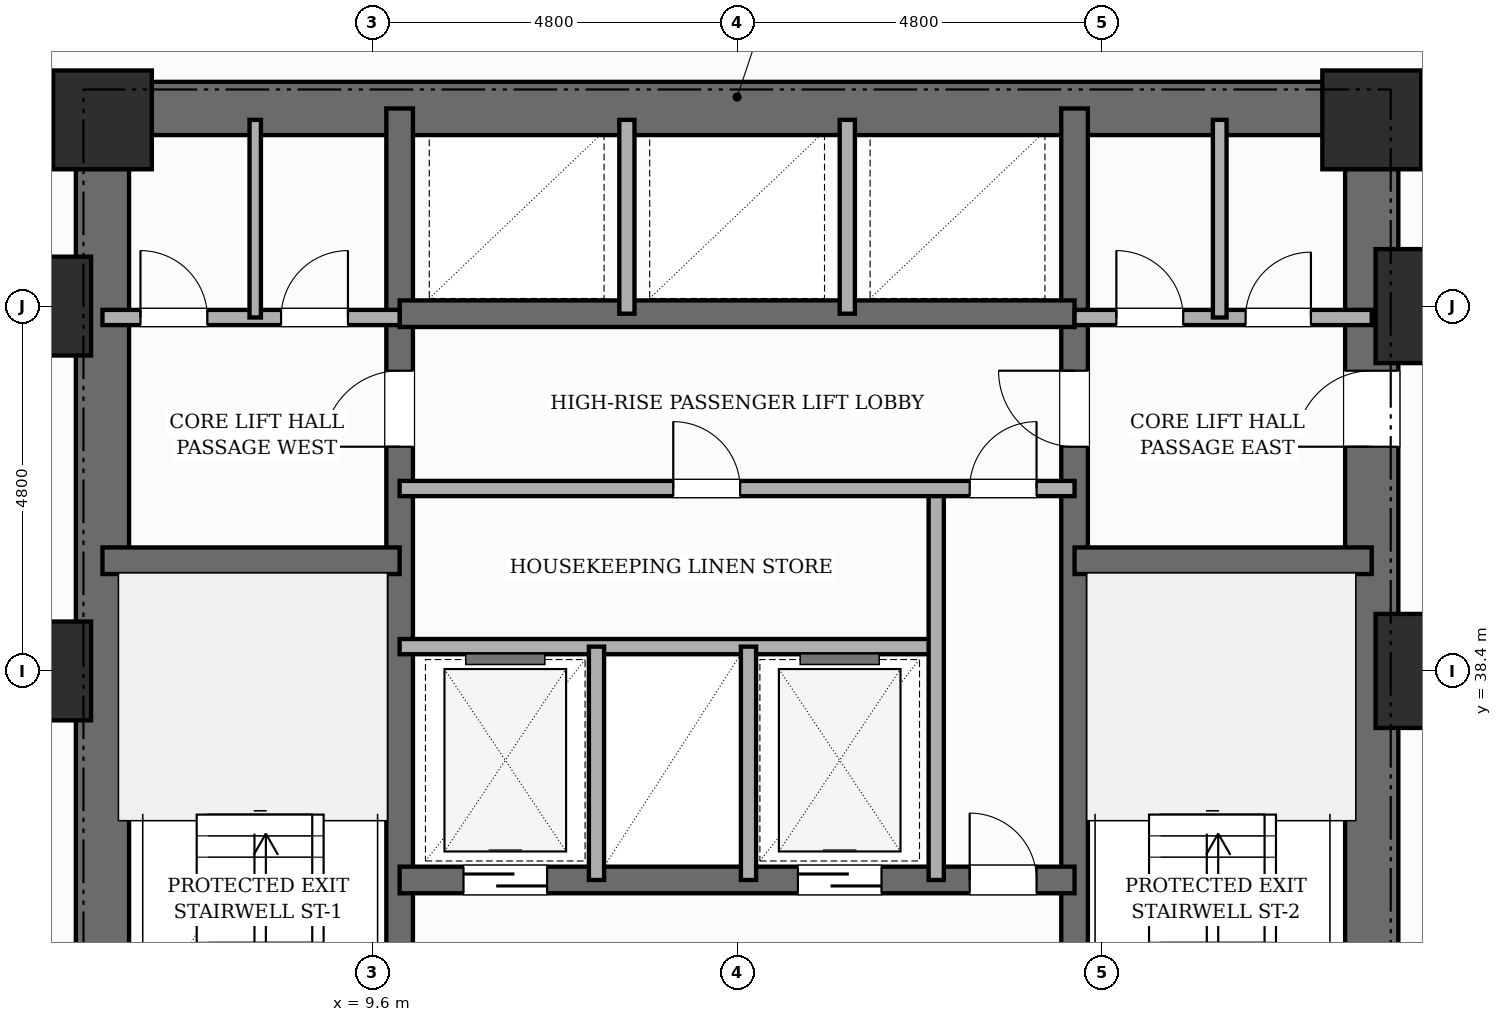
"""IFC4 building model, lengths in metres.
Left out: names, types, materials, properties, quantities, classifications, styles, units other than length and angle.
Written with IfcOpenShell. Run it as: python <this file> out.ifc"""

import sys

from ifc_helpers import new_model, si_unit, direction, frame, frame_2d, origin, origin_2d, place, context, subcontext, project, spatial, rectangle, extrude, element, fill, save


model = new_model("IFC4")
c1 = context("Model", 3, precision=1e-05, world=origin(), true_north=direction((0.0, 1.0)))
c2 = subcontext(c1, "Body", "Model", "MODEL_VIEW")
j1 = project(units=[si_unit("LENGTHUNIT", "METRE"), si_unit("PLANEANGLEUNIT", "RADIAN")], contexts=[c1])
p1 = place(None, origin())
s1 = spatial("IfcSite", under=j1, at=p1, CompositionType="ELEMENT")
p2 = place(p1, origin())
s2 = spatial("IfcBuilding", under=s1, at=p2, CompositionType="ELEMENT")
p3 = place(p2, frame((0.0, 0.0, 14.8)))
s3 = spatial("IfcBuildingStorey", under=s2, at=p3, CompositionType="ELEMENT", Elevation=14.8)
p4 = place(p3, frame((6.05, 30.55, 0.0), z_axis=(0.0, 0.0, 1.0), x_axis=(0.0, 1.0, 0.0)))
e1 = element("IfcWall", 1, at=p4, inside=s3, PredefinedType="SHEAR", context=c2, shape_type="SweptSolid", body=[
    extrude(rectangle(XDim=15.6, YDim=0.7, at=frame_2d((7.8, 0.0))), origin(), (0.0, 0.0, 1.0), 4.8),
])
p5 = place(p3, frame((22.75, 30.55, 0.0), z_axis=(0.0, 0.0, 1.0), x_axis=(0.0, 1.0, 0.0)))
e2 = element("IfcWall", 2, at=p5, inside=s3, PredefinedType="SHEAR", context=c2, shape_type="SweptSolid", body=[
    extrude(rectangle(XDim=15.6, YDim=0.7, at=frame_2d((7.8, 0.0))), origin(), (0.0, 0.0, 1.0), 4.8),
])
p6 = place(p5, frame((10.8, 0.0, 0.0)))
e3 = element("IfcOpeningElement", 3, at=p6, cuts=e2, PredefinedType="OPENING", context=c2, shape_type="SweptSolid", body=[
    extrude(rectangle(XDim=1.0, YDim=2.15, at=frame_2d((0.5, 1.075))), frame((0.0, 0.36, 0.0), z_axis=(0.0, -1.0, 0.0), x_axis=(1.0, 0.0, 0.0)), (0.0, 0.0, 1.0), 0.72),
])
p7 = place(p3, frame((6.05, 45.8, 0.0), z_axis=(0.0, 0.0, 1.0), x_axis=(1.0, 0.0, 0.0)))
e4 = element("IfcWall", 4, at=p7, inside=s3, PredefinedType="SHEAR", context=c2, shape_type="SweptSolid", body=[
    extrude(rectangle(XDim=16.7, YDim=0.7, at=frame_2d((8.35, 0.0))), origin(), (0.0, 0.0, 1.0), 4.8),
])
p8 = place(p3, frame((9.96, 30.9, 0.0), z_axis=(0.0, 0.0, 1.0), x_axis=(0.0, 1.0, 0.0)))
e5 = element("IfcWall", 5, at=p8, inside=s3, PredefinedType="SHEAR", context=c2, shape_type="SweptSolid", body=[
    extrude(rectangle(XDim=14.9, YDim=0.35, at=frame_2d((7.45, 0.0))), origin(), (0.0, 0.0, 1.0), 4.8),
])
p9 = place(p8, frame((0.65, 0.0, 0.0)))
e6 = element("IfcOpeningElement", 6, at=p9, cuts=e5, PredefinedType="OPENING", context=c2, shape_type="SweptSolid", body=[
    extrude(rectangle(XDim=0.95, YDim=2.1, at=frame_2d((0.475, 1.05))), frame((0.0, 0.185, 0.0), z_axis=(0.0, -1.0, 0.0), x_axis=(1.0, 0.0, 0.0)), (0.0, 0.0, 1.0), 0.37),
])
p10 = place(p8, frame((10.45, 0.0, 0.0)))
e7 = element("IfcOpeningElement", 7, at=p10, cuts=e5, PredefinedType="OPENING", context=c2, shape_type="SweptSolid", body=[
    extrude(rectangle(XDim=1.0, YDim=2.15, at=frame_2d((0.5, 1.075))), frame((0.0, 0.185, 0.0), z_axis=(0.0, -1.0, 0.0), x_axis=(1.0, 0.0, 0.0)), (0.0, 0.0, 1.0), 0.37),
])
p11 = place(p3, frame((18.84, 30.9, 0.0), z_axis=(0.0, 0.0, 1.0), x_axis=(0.0, 1.0, 0.0)))
e8 = element("IfcWall", 8, at=p11, inside=s3, PredefinedType="SHEAR", context=c2, shape_type="SweptSolid", body=[
    extrude(rectangle(XDim=14.9, YDim=0.35, at=frame_2d((7.45, 0.0))), origin(), (0.0, 0.0, 1.0), 4.8),
])
p12 = place(p11, frame((0.65, 0.0, 0.0)))
e9 = element("IfcOpeningElement", 9, at=p12, cuts=e8, PredefinedType="OPENING", context=c2, shape_type="SweptSolid", body=[
    extrude(rectangle(XDim=0.95, YDim=2.1, at=frame_2d((0.475, 1.05))), frame((0.0, 0.185, 0.0), z_axis=(0.0, -1.0, 0.0), x_axis=(1.0, 0.0, 0.0)), (0.0, 0.0, 1.0), 0.37),
])
p13 = place(p11, frame((10.45, 0.0, 0.0)))
e10 = element("IfcOpeningElement", 10, at=p13, cuts=e8, PredefinedType="OPENING", context=c2, shape_type="SweptSolid", body=[
    extrude(rectangle(XDim=1.0, YDim=2.15, at=frame_2d((0.5, 1.075))), frame((0.0, 0.185, 0.0), z_axis=(0.0, -1.0, 0.0), x_axis=(1.0, 0.0, 0.0)), (0.0, 0.0, 1.0), 0.37),
])
for number, where, z_axis, x_axis in (
    (11, (6.05, 39.85, 0.0), (0.0, 0.0, 1.0), (1.0, 0.0, 0.0)),
    (12, (18.84, 39.85, 0.0), (0.0, 0.0, 1.0), (1.0, 0.0, 0.0)),
):
    element("IfcWall", number, at=place(p3, frame(where, z_axis=z_axis, x_axis=x_axis)), inside=s3, PredefinedType="SHEAR", context=c2, shape_type="SweptSolid", body=[
        extrude(rectangle(XDim=3.91, YDim=0.35, at=frame_2d((1.955, 0.0))), origin(), (0.0, 0.0, 1.0), 4.8),
    ])
p14 = place(p3, frame((9.96, 35.65, 0.0), z_axis=(0.0, 0.0, 1.0), x_axis=(1.0, 0.0, 0.0)))
e13 = element("IfcWall", 13, at=p14, inside=s3, PredefinedType="SHEAR", context=c2, shape_type="SweptSolid", body=[
    extrude(rectangle(XDim=8.88, YDim=0.35, at=frame_2d((4.44, 0.0))), origin(), (0.0, 0.0, 1.0), 4.8),
])
p15 = place(p14, frame((0.84, 0.0, 0.0)))
e14 = element("IfcOpeningElement", 14, at=p15, cuts=e13, PredefinedType="OPENING", context=c2, shape_type="SweptSolid", body=[
    extrude(rectangle(XDim=1.1, YDim=2.15, at=frame_2d((0.55, 1.075))), frame((0.0, 0.185, 0.0), z_axis=(0.0, -1.0, 0.0), x_axis=(1.0, 0.0, 0.0)), (0.0, 0.0, 1.0), 0.37),
])
p16 = place(p14, frame((5.24, 0.0, 0.0)))
e15 = element("IfcOpeningElement", 15, at=p16, cuts=e13, PredefinedType="OPENING", context=c2, shape_type="SweptSolid", body=[
    extrude(rectangle(XDim=1.1, YDim=2.15, at=frame_2d((0.55, 1.075))), frame((0.0, 0.185, 0.0), z_axis=(0.0, -1.0, 0.0), x_axis=(1.0, 0.0, 0.0)), (0.0, 0.0, 1.0), 0.37),
])
p17 = place(p14, frame((7.5, 0.0, 0.0)))
e16 = element("IfcOpeningElement", 16, at=p17, cuts=e13, PredefinedType="OPENING", context=c2, shape_type="SweptSolid", body=[
    extrude(rectangle(XDim=0.88, YDim=2.1, at=frame_2d((0.44, 1.05))), frame((0.0, 0.185, 0.0), z_axis=(0.0, -1.0, 0.0), x_axis=(1.0, 0.0, 0.0)), (0.0, 0.0, 1.0), 0.37),
])
p18 = place(p3, frame((9.96, 43.1, 0.0), z_axis=(0.0, 0.0, 1.0), x_axis=(1.0, 0.0, 0.0)))
e17 = element("IfcWall", 17, at=p18, inside=s3, PredefinedType="SHEAR", context=c2, shape_type="SweptSolid", body=[
    extrude(rectangle(XDim=8.88, YDim=0.35, at=frame_2d((4.44, 0.0))), origin(), (0.0, 0.0, 1.0), 4.8),
])
for number, where, z_axis, x_axis in (
    (18, (5.25, 38.4, 0.0), (0.0, 0.0, 1.0), (1.0, 0.0, 0.0)),
    (19, (5.25, 43.2, 0.0), (0.0, 0.0, 1.0), (1.0, 0.0, 0.0)),
    (20, (6.05, 45.65, 0.0), (0.0, 0.0, 1.0), (1.0, 0.0, 0.0)),
    (21, (22.75, 45.65, 0.0), (0.0, 0.0, 1.0), (1.0, 0.0, 0.0)),
):
    element("IfcColumn", number, at=place(p3, frame(where, z_axis=z_axis, x_axis=x_axis)), inside=s3, PredefinedType="COLUMN", context=c2, shape_type="SweptSolid", body=[
        extrude(rectangle(XDim=1.3, YDim=1.3, at=origin_2d()), origin(), (0.0, 0.0, 1.0), 4.8),
    ])
for number, where, z_axis, x_axis in (
    (22, (23.55, 38.4, 0.0), (0.0, 0.0, 1.0), (1.0, 0.0, 0.0)),
    (23, (23.55, 43.2, 0.0), (0.0, 0.0, 1.0), (1.0, 0.0, 0.0)),
):
    element("IfcColumn", number, at=place(p3, frame(where, z_axis=z_axis, x_axis=x_axis)), inside=s3, PredefinedType="USERDEFINED", context=c2, shape_type="SweptSolid", body=[
        extrude(rectangle(XDim=1.5, YDim=1.5, at=origin_2d()), origin(), (0.0, 0.0, 1.0), 4.8),
    ])
p19 = place(p3, frame((9.96, 38.72, 0.0), z_axis=(0.0, 0.0, 1.0), x_axis=(1.0, 0.0, 0.0)))
e24 = element("IfcWall", 24, at=p19, inside=s3, PredefinedType="POLYGONAL", context=c2, shape_type="SweptSolid", body=[
    extrude(rectangle(XDim=7.06, YDim=0.2, at=frame_2d((3.53, 0.0))), origin(), (0.0, 0.0, 1.0), 4.4),
])
for number, where, z_axis, x_axis in (
    (25, (12.55, 35.65, 0.0), (0.0, 0.0, 1.0), (0.0, 1.0, 0.0)),
    (26, (14.55, 35.65, 0.0), (0.0, 0.0, 1.0), (0.0, 1.0, 0.0)),
):
    element("IfcWall", number, at=place(p3, frame(where, z_axis=z_axis, x_axis=x_axis)), inside=s3, PredefinedType="POLYGONAL", context=c2, shape_type="SweptSolid", body=[
        extrude(rectangle(XDim=3.07, YDim=0.2, at=frame_2d((1.535, 0.0))), origin(), (0.0, 0.0, 1.0), 4.4),
    ])
p20 = place(p3, frame((17.02, 35.65, 0.0), z_axis=(0.0, 0.0, 1.0), x_axis=(0.0, 1.0, 0.0)))
e27 = element("IfcWall", 27, at=p20, inside=s3, PredefinedType="POLYGONAL", context=c2, shape_type="SweptSolid", body=[
    extrude(rectangle(XDim=5.15, YDim=0.2, at=frame_2d((2.575, 0.0))), origin(), (0.0, 0.0, 1.0), 4.4),
])
p21 = place(p3, frame((9.96, 40.8, 0.0), z_axis=(0.0, 0.0, 1.0), x_axis=(1.0, 0.0, 0.0)))
e28 = element("IfcWall", 28, at=p21, inside=s3, PredefinedType="POLYGONAL", context=c2, shape_type="SweptSolid", body=[
    extrude(rectangle(XDim=8.88, YDim=0.2, at=frame_2d((4.44, 0.0))), origin(), (0.0, 0.0, 1.0), 4.4),
])
p22 = place(p21, frame((7.5, 0.0, 0.0)))
e29 = element("IfcOpeningElement", 29, at=p22, cuts=e28, PredefinedType="OPENING", context=c2, shape_type="SweptSolid", body=[
    extrude(rectangle(XDim=0.88, YDim=2.1, at=frame_2d((0.44, 1.05))), frame((0.0, 0.11, 0.0), z_axis=(0.0, -1.0, 0.0), x_axis=(1.0, 0.0, 0.0)), (0.0, 0.0, 1.0), 0.22),
])
p23 = place(p21, frame((3.6, 0.0, 0.0)))
e30 = element("IfcOpeningElement", 30, at=p23, cuts=e28, PredefinedType="OPENING", context=c2, shape_type="SweptSolid", body=[
    extrude(rectangle(XDim=0.88, YDim=2.1, at=frame_2d((0.44, 1.05))), frame((0.0, 0.11, 0.0), z_axis=(0.0, -1.0, 0.0), x_axis=(1.0, 0.0, 0.0)), (0.0, 0.0, 1.0), 0.22),
])
p24 = place(p3, frame((18.84, 43.05, 0.0), z_axis=(0.0, 0.0, 1.0), x_axis=(1.0, 0.0, 0.0)))
e31 = element("IfcWall", 31, at=p24, inside=s3, PredefinedType="POLYGONAL", context=c2, shape_type="SweptSolid", body=[
    extrude(rectangle(XDim=3.91, YDim=0.2, at=frame_2d((1.955, 0.0))), origin(), (0.0, 0.0, 1.0), 3.48),
])
p25 = place(p24, frame((0.55, 0.0, 0.0)))
e32 = element("IfcOpeningElement", 32, at=p25, cuts=e31, PredefinedType="OPENING", context=c2, shape_type="SweptSolid", body=[
    extrude(rectangle(XDim=0.88, YDim=2.1, at=frame_2d((0.44, 1.05))), frame((0.0, 0.11, 0.0), z_axis=(0.0, -1.0, 0.0), x_axis=(1.0, 0.0, 0.0)), (0.0, 0.0, 1.0), 0.22),
])
p26 = place(p24, frame((2.25, 0.0, 0.0)))
e33 = element("IfcOpeningElement", 33, at=p26, cuts=e31, PredefinedType="OPENING", context=c2, shape_type="SweptSolid", body=[
    extrude(rectangle(XDim=0.86, YDim=2.1, at=frame_2d((0.43, 1.05))), frame((0.0, 0.11, 0.0), z_axis=(0.0, -1.0, 0.0), x_axis=(1.0, 0.0, 0.0)), (0.0, 0.0, 1.0), 0.22),
])
p27 = place(p3, frame((6.05, 43.05, 0.0), z_axis=(0.0, 0.0, 1.0), x_axis=(1.0, 0.0, 0.0)))
e34 = element("IfcWall", 34, at=p27, inside=s3, PredefinedType="POLYGONAL", context=c2, shape_type="SweptSolid", body=[
    extrude(rectangle(XDim=3.91, YDim=0.2, at=frame_2d((1.955, 0.0))), origin(), (0.0, 0.0, 1.0), 3.48),
])
p28 = place(p27, frame((0.5, 0.0, 0.0)))
e35 = element("IfcOpeningElement", 35, at=p28, cuts=e34, PredefinedType="OPENING", context=c2, shape_type="SweptSolid", body=[
    extrude(rectangle(XDim=0.88, YDim=2.1, at=frame_2d((0.44, 1.05))), frame((0.0, 0.11, 0.0), z_axis=(0.0, -1.0, 0.0), x_axis=(1.0, 0.0, 0.0)), (0.0, 0.0, 1.0), 0.22),
])
p29 = place(p27, frame((2.35, 0.0, 0.0)))
e36 = element("IfcOpeningElement", 36, at=p29, cuts=e34, PredefinedType="OPENING", context=c2, shape_type="SweptSolid", body=[
    extrude(rectangle(XDim=0.88, YDim=2.1, at=frame_2d((0.44, 1.05))), frame((0.0, 0.11, 0.0), z_axis=(0.0, -1.0, 0.0), x_axis=(1.0, 0.0, 0.0)), (0.0, 0.0, 1.0), 0.22),
])
for number, where, z_axis, x_axis in (
    (37, (12.95, 43.1, 0.0), (0.0, 0.0, 1.0), (0.0, 1.0, 0.0)),
    (38, (15.85, 43.1, 0.0), (0.0, 0.0, 1.0), (0.0, 1.0, 0.0)),
):
    element("IfcWall", number, at=place(p3, frame(where, z_axis=z_axis, x_axis=x_axis)), inside=s3, PredefinedType="POLYGONAL", context=c2, shape_type="SweptSolid", body=[
        extrude(rectangle(XDim=2.55, YDim=0.2, at=frame_2d((1.275, 0.0))), origin(), (0.0, 0.0, 1.0), 4.4),
    ])
p30 = place(p3, frame((8.06, 43.05, 0.0), z_axis=(0.0, 0.0, 1.0), x_axis=(0.0, 1.0, 0.0)))
e39 = element("IfcWall", 39, at=p30, inside=s3, PredefinedType="PARTITIONING", context=c2, shape_type="SweptSolid", body=[
    extrude(rectangle(XDim=2.6, YDim=0.15, at=frame_2d((1.3, 0.0))), origin(), (0.0, 0.0, 1.0), 4.4),
])
p31 = place(p3, frame((20.75, 43.05, 0.0), z_axis=(0.0, 0.0, 1.0), x_axis=(0.0, 1.0, 0.0)))
e40 = element("IfcWall", 40, at=p31, inside=s3, PredefinedType="PLUMBINGWALL", context=c2, shape_type="SweptSolid", body=[
    extrude(rectangle(XDim=2.6, YDim=0.18, at=frame_2d((1.3, 0.0))), origin(), (0.0, 0.0, 1.0), 4.4),
])
p32 = place(p15, origin())
e41 = element("IfcDoor", 41, at=p32, inside=s3, OperationType="SLIDING_TO_LEFT", PredefinedType="DOOR", context=c2, shape_type="SweptSolid", body=[
    extrude(rectangle(XDim=1.1, YDim=2.15, at=frame_2d((0.55, 1.075))), frame((0.0, 0.025, 0.0), z_axis=(0.0, -1.0, 0.0), x_axis=(1.0, 0.0, 0.0)), (0.0, 0.0, 1.0), 0.05),
])
fill(e14, e41)
p33 = place(p16, origin())
e42 = element("IfcDoor", 42, at=p33, inside=s3, OperationType="SLIDING_TO_RIGHT", PredefinedType="DOOR", context=c2, shape_type="SweptSolid", body=[
    extrude(rectangle(XDim=1.1, YDim=2.15, at=frame_2d((0.55, 1.075))), frame((0.0, 0.025, 0.0), z_axis=(0.0, -1.0, 0.0), x_axis=(1.0, 0.0, 0.0)), (0.0, 0.0, 1.0), 0.05),
])
fill(e15, e42)
p34 = place(p17, origin())
e43 = element("IfcDoor", 43, at=p34, inside=s3, OperationType="SINGLE_SWING_LEFT", PredefinedType="DOOR", context=c2, shape_type="SweptSolid", body=[
    extrude(rectangle(XDim=0.88, YDim=2.1, at=frame_2d((0.44, 1.05))), frame((0.0, 0.025, 0.0), z_axis=(0.0, -1.0, 0.0), x_axis=(1.0, 0.0, 0.0)), (0.0, 0.0, 1.0), 0.05),
])
fill(e16, e43)
p35 = place(p22, origin())
e44 = element("IfcDoor", 44, at=p35, inside=s3, OperationType="SINGLE_SWING_RIGHT", PredefinedType="DOOR", context=c2, shape_type="SweptSolid", body=[
    extrude(rectangle(XDim=0.88, YDim=2.1, at=frame_2d((0.44, 1.05))), frame((0.0, 0.025, 0.0), z_axis=(0.0, -1.0, 0.0), x_axis=(1.0, 0.0, 0.0)), (0.0, 0.0, 1.0), 0.05),
])
fill(e29, e44)
p36 = place(p10, origin())
e45 = element("IfcDoor", 45, at=p36, inside=s3, OperationType="SINGLE_SWING_LEFT", PredefinedType="DOOR", context=c2, shape_type="SweptSolid", body=[
    extrude(rectangle(XDim=1.0, YDim=2.15, at=frame_2d((0.5, 1.075))), frame((0.0, 0.025, 0.0), z_axis=(0.0, -1.0, 0.0), x_axis=(1.0, 0.0, 0.0)), (0.0, 0.0, 1.0), 0.05),
])
fill(e7, e45)
p37 = place(p13, origin())
e46 = element("IfcDoor", 46, at=p37, inside=s3, OperationType="SINGLE_SWING_RIGHT", PredefinedType="DOOR", context=c2, shape_type="SweptSolid", body=[
    extrude(rectangle(XDim=1.0, YDim=2.15, at=frame_2d((0.5, 1.075))), frame((0.0, 0.025, 0.0), z_axis=(0.0, -1.0, 0.0), x_axis=(1.0, 0.0, 0.0)), (0.0, 0.0, 1.0), 0.05),
])
fill(e10, e46)
p38 = place(p6, origin())
e47 = element("IfcDoor", 47, at=p38, inside=s3, OperationType="SINGLE_SWING_LEFT", PredefinedType="DOOR", context=c2, shape_type="SweptSolid", body=[
    extrude(rectangle(XDim=1.0, YDim=2.15, at=frame_2d((0.5, 1.075))), frame((0.0, 0.025, 0.0), z_axis=(0.0, -1.0, 0.0), x_axis=(1.0, 0.0, 0.0)), (0.0, 0.0, 1.0), 0.05),
])
fill(e3, e47)
p39 = place(p28, origin())
e48 = element("IfcDoor", 48, at=p39, inside=s3, OperationType="SINGLE_SWING_LEFT", PredefinedType="DOOR", context=c2, shape_type="SweptSolid", body=[
    extrude(rectangle(XDim=0.88, YDim=2.1, at=frame_2d((0.44, 1.05))), frame((0.0, 0.025, 0.0), z_axis=(0.0, -1.0, 0.0), x_axis=(1.0, 0.0, 0.0)), (0.0, 0.0, 1.0), 0.05),
])
fill(e35, e48)
p40 = place(p29, origin())
e49 = element("IfcDoor", 49, at=p40, inside=s3, OperationType="SINGLE_SWING_RIGHT", PredefinedType="DOOR", context=c2, shape_type="SweptSolid", body=[
    extrude(rectangle(XDim=0.88, YDim=2.1, at=frame_2d((0.44, 1.05))), frame((0.0, 0.025, 0.0), z_axis=(0.0, -1.0, 0.0), x_axis=(1.0, 0.0, 0.0)), (0.0, 0.0, 1.0), 0.05),
])
fill(e36, e49)
p41 = place(p23, origin())
e50 = element("IfcDoor", 50, at=p41, inside=s3, OperationType="SINGLE_SWING_LEFT", PredefinedType="DOOR", context=c2, shape_type="SweptSolid", body=[
    extrude(rectangle(XDim=0.88, YDim=2.1, at=frame_2d((0.44, 1.05))), frame((0.0, 0.025, 0.0), z_axis=(0.0, -1.0, 0.0), x_axis=(1.0, 0.0, 0.0)), (0.0, 0.0, 1.0), 0.05),
])
fill(e30, e50)
p42 = place(p25, origin())
e51 = element("IfcDoor", 51, at=p42, inside=s3, OperationType="SINGLE_SWING_LEFT", PredefinedType="DOOR", context=c2, shape_type="SweptSolid", body=[
    extrude(rectangle(XDim=0.88, YDim=2.1, at=frame_2d((0.44, 1.05))), frame((0.0, 0.025, 0.0), z_axis=(0.0, -1.0, 0.0), x_axis=(1.0, 0.0, 0.0)), (0.0, 0.0, 1.0), 0.05),
])
fill(e32, e51)
p43 = place(p26, origin())
e52 = element("IfcDoor", 52, at=p43, inside=s3, OperationType="SINGLE_SWING_RIGHT", PredefinedType="DOOR", context=c2, shape_type="SweptSolid", body=[
    extrude(rectangle(XDim=0.86, YDim=2.1, at=frame_2d((0.43, 1.05))), frame((0.0, 0.025, 0.0), z_axis=(0.0, -1.0, 0.0), x_axis=(1.0, 0.0, 0.0)), (0.0, 0.0, 1.0), 0.05),
])
fill(e33, e52)
save(model, sys.argv[1])
